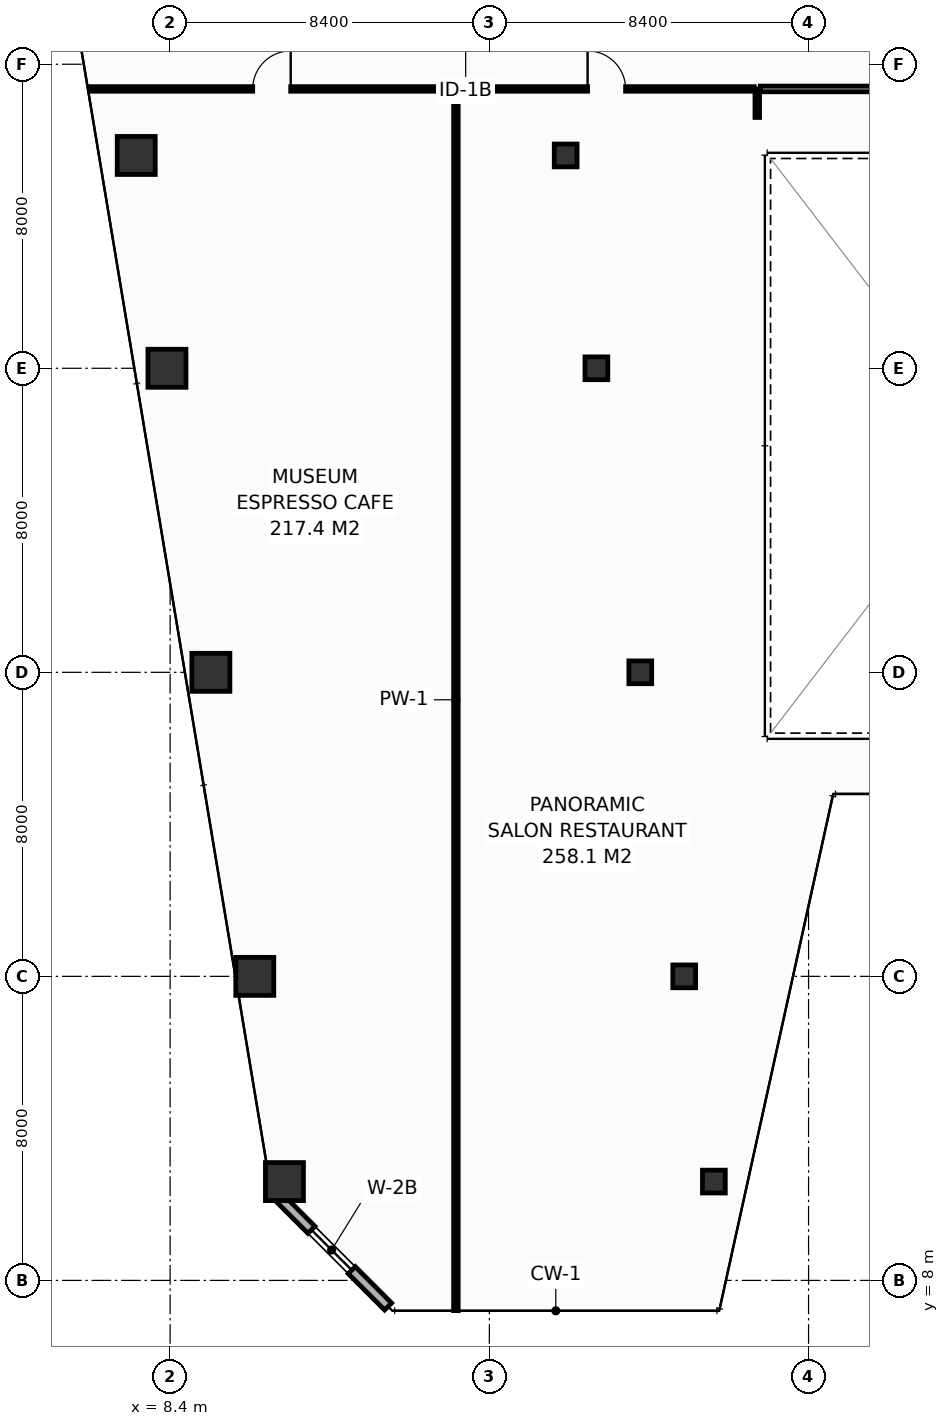
"""IFC4 building model, lengths in metres.
Left out: names, types, materials, properties, quantities, classifications, styles, units other than length and angle.
Written with IfcOpenShell. Run it as: python <this file> out.ifc"""

import sys

from ifc_helpers import new_model, si_unit, direction, frame, frame_2d, origin, origin_2d, place, context, subcontext, project, spatial, rectangle, hollow_rectangle, extrude, element, fill, save


model = new_model("IFC4")
c1 = context("Model", 3, precision=1e-05, world=origin(), true_north=direction((0.0, 1.0)))
c2 = subcontext(c1, "Body", "Model", "MODEL_VIEW")
j1 = project(units=[si_unit("LENGTHUNIT", "METRE"), si_unit("PLANEANGLEUNIT", "RADIAN")], contexts=[c1])
p1 = place(None, origin())
s1 = spatial("IfcSite", under=j1, at=p1, CompositionType="ELEMENT")
p2 = place(p1, origin())
s2 = spatial("IfcBuilding", under=s1, at=p2, CompositionType="ELEMENT")
p3 = place(p2, frame((0.0, 0.0, 106.0)))
s3 = spatial("IfcBuildingStorey", under=s2, at=p3, CompositionType="ELEMENT", Elevation=106.0)
p4 = place(p3, frame((11.408, 10.6, 0.0), z_axis=(0.0, 0.0, 1.0), x_axis=(1.0, 0.0, 0.0)))
e1 = element("IfcColumn", 1, at=p4, inside=s3, PredefinedType="COLUMN", context=c2, shape_type="SweptSolid", body=[
    extrude(hollow_rectangle(XDim=1.0, YDim=1.0, WallThickness=0.045, at=origin_2d()), origin(), (0.0, 0.0, 1.0), 4.4),
])
p5 = place(p3, frame((22.708, 10.6, 0.0), z_axis=(0.0, 0.0, 1.0), x_axis=(1.0, 0.0, 0.0)))
e2 = element("IfcColumn", 2, at=p5, inside=s3, PredefinedType="COLUMN", context=c2, shape_type="SweptSolid", body=[
    extrude(hollow_rectangle(XDim=0.6, YDim=0.6, WallThickness=0.028, at=origin_2d()), origin(), (0.0, 0.0, 1.0), 4.4),
])
p6 = place(p3, frame((10.628, 16.0, 0.0), z_axis=(0.0, 0.0, 1.0), x_axis=(1.0, 0.0, 0.0)))
e3 = element("IfcColumn", 3, at=p6, inside=s3, PredefinedType="COLUMN", context=c2, shape_type="SweptSolid", body=[
    extrude(hollow_rectangle(XDim=1.0, YDim=1.0, WallThickness=0.045, at=origin_2d()), origin(), (0.0, 0.0, 1.0), 4.4),
])
p7 = place(p3, frame((21.928, 16.0, 0.0), z_axis=(0.0, 0.0, 1.0), x_axis=(1.0, 0.0, 0.0)))
e4 = element("IfcColumn", 4, at=p7, inside=s3, PredefinedType="COLUMN", context=c2, shape_type="SweptSolid", body=[
    extrude(hollow_rectangle(XDim=0.6, YDim=0.6, WallThickness=0.028, at=origin_2d()), origin(), (0.0, 0.0, 1.0), 4.4),
])
p8 = place(p3, frame((9.472, 24.0, 0.0), z_axis=(0.0, 0.0, 1.0), x_axis=(1.0, 0.0, 0.0)))
e5 = element("IfcColumn", 5, at=p8, inside=s3, PredefinedType="COLUMN", context=c2, shape_type="SweptSolid", body=[
    extrude(hollow_rectangle(XDim=1.0, YDim=1.0, WallThickness=0.045, at=origin_2d()), origin(), (0.0, 0.0, 1.0), 4.4),
])
p9 = place(p3, frame((20.772, 24.0, 0.0), z_axis=(0.0, 0.0, 1.0), x_axis=(1.0, 0.0, 0.0)))
e6 = element("IfcColumn", 6, at=p9, inside=s3, PredefinedType="COLUMN", context=c2, shape_type="SweptSolid", body=[
    extrude(hollow_rectangle(XDim=0.6, YDim=0.6, WallThickness=0.028, at=origin_2d()), origin(), (0.0, 0.0, 1.0), 4.4),
])
p10 = place(p3, frame((8.317, 32.0, 0.0), z_axis=(0.0, 0.0, 1.0), x_axis=(1.0, 0.0, 0.0)))
e7 = element("IfcColumn", 7, at=p10, inside=s3, PredefinedType="COLUMN", context=c2, shape_type="SweptSolid", body=[
    extrude(hollow_rectangle(XDim=1.0, YDim=1.0, WallThickness=0.045, at=origin_2d()), origin(), (0.0, 0.0, 1.0), 4.4),
])
p11 = place(p3, frame((19.617, 32.0, 0.0), z_axis=(0.0, 0.0, 1.0), x_axis=(1.0, 0.0, 0.0)))
e8 = element("IfcColumn", 8, at=p11, inside=s3, PredefinedType="COLUMN", context=c2, shape_type="SweptSolid", body=[
    extrude(hollow_rectangle(XDim=0.6, YDim=0.6, WallThickness=0.028, at=origin_2d()), origin(), (0.0, 0.0, 1.0), 4.4),
])
p12 = place(p3, frame((7.508, 37.6, 0.0), z_axis=(0.0, 0.0, 1.0), x_axis=(1.0, 0.0, 0.0)))
e9 = element("IfcColumn", 9, at=p12, inside=s3, PredefinedType="COLUMN", context=c2, shape_type="SweptSolid", body=[
    extrude(hollow_rectangle(XDim=1.0, YDim=1.0, WallThickness=0.045, at=origin_2d()), origin(), (0.0, 0.0, 1.0), 4.4),
])
p13 = place(p3, frame((18.808, 37.6, 0.0), z_axis=(0.0, 0.0, 1.0), x_axis=(1.0, 0.0, 0.0)))
e10 = element("IfcColumn", 10, at=p13, inside=s3, PredefinedType="COLUMN", context=c2, shape_type="SweptSolid", body=[
    extrude(hollow_rectangle(XDim=0.6, YDim=0.6, WallThickness=0.028, at=origin_2d()), origin(), (0.0, 0.0, 1.0), 4.4),
])
p14 = place(p3, frame((11.162, 10.287, 0.0), z_axis=(0.0, 0.0, 1.0), x_axis=(0.70707775441, -0.707135806771, 0.0)))
e11 = element("IfcWall", 11, at=p14, inside=s3, PredefinedType="STANDARD", context=c2, shape_type="SweptSolid", body=[
    extrude(rectangle(XDim=4.206, YDim=0.26, at=frame_2d((2.103, 0.0))), origin(), (0.0, 0.0, 1.0), 4.15),
])
p15 = place(p14, frame((1.353, 0.0, 0.9)))
e12 = element("IfcOpeningElement", 12, at=p15, cuts=e11, PredefinedType="OPENING", context=c2, shape_type="SweptSolid", body=[
    extrude(rectangle(XDim=1.5, YDim=1.85, at=frame_2d((0.75, 0.925))), frame((0.0, 0.14, 0.0), z_axis=(0.0, -1.0, 0.0), x_axis=(1.0, 0.0, 0.0)), (0.0, 0.0, 1.0), 0.28),
])
p16 = place(p3, frame((15.92, 7.205, 0.0), z_axis=(0.0, 0.0, 1.0), x_axis=(0.0, 1.0, 0.0)))
e13 = element("IfcWall", 13, at=p16, inside=s3, PredefinedType="PARTITIONING", context=c2, shape_type="SweptSolid", body=[
    extrude(rectangle(XDim=32.145, YDim=0.12, at=frame_2d((16.073, 0.0))), origin(), (0.0, 0.0, 1.0), 3.335),
])
p17 = place(p3, frame((23.85, 38.6, 0.0), z_axis=(0.0, 0.0, 1.0), x_axis=(0.0, 1.0, 0.0)))
e14 = element("IfcWall", 14, at=p17, inside=s3, PredefinedType="PARTITIONING", context=c2, shape_type="SweptSolid", body=[
    extrude(rectangle(XDim=0.75, YDim=0.12, at=frame_2d((0.375, 0.0))), origin(), (0.0, 0.0, 1.0), 4.15),
])
p18 = place(p3, frame((6.305, 39.35, 0.0), z_axis=(0.0, 0.0, 1.0), x_axis=(1.0, 0.0, 0.0)))
e15 = element("IfcWall", 15, at=p18, inside=s3, PredefinedType="PARTITIONING", context=c2, shape_type="SweptSolid", body=[
    extrude(rectangle(XDim=9.535, YDim=0.12, at=frame_2d((4.768, 0.0))), origin(), (0.0, 0.0, 1.0), 3.635),
])
p19 = place(p18, frame((4.268, 0.0, 0.0)))
e16 = element("IfcOpeningElement", 16, at=p19, cuts=e15, PredefinedType="OPENING", context=c2, shape_type="SweptSolid", body=[
    extrude(rectangle(XDim=1.0, YDim=2.15, at=frame_2d((0.5, 1.075))), frame((0.0, 0.07, 0.0), z_axis=(0.0, -1.0, 0.0), x_axis=(1.0, 0.0, 0.0)), (0.0, 0.0, 1.0), 0.14),
])
p20 = place(p3, frame((16.0, 39.35, 0.0), z_axis=(0.0, 0.0, 1.0), x_axis=(1.0, 0.0, 0.0)))
e17 = element("IfcWall", 17, at=p20, inside=s3, PredefinedType="PARTITIONING", context=c2, shape_type="SweptSolid", body=[
    extrude(rectangle(XDim=7.77, YDim=0.12, at=frame_2d((3.885, 0.0))), origin(), (0.0, 0.0, 1.0), 3.335),
])
p21 = place(p20, frame((3.385, 0.0, 0.0)))
e18 = element("IfcOpeningElement", 18, at=p21, cuts=e17, PredefinedType="OPENING", context=c2, shape_type="SweptSolid", body=[
    extrude(rectangle(XDim=1.0, YDim=2.15, at=frame_2d((0.5, 1.075))), frame((0.0, 0.07, 0.0), z_axis=(0.0, -1.0, 0.0), x_axis=(1.0, 0.0, 0.0)), (0.0, 0.0, 1.0), 0.14),
])
p22 = place(p3, frame((23.93, 39.35, 0.0), z_axis=(0.0, 0.0, 1.0), x_axis=(1.0, 0.0, 0.0)))
e19 = element("IfcWall", 19, at=p22, inside=s3, PredefinedType="PARTITIONING", context=c2, shape_type="SweptSolid", body=[
    extrude(rectangle(XDim=12.14, YDim=0.15, at=frame_2d((6.07, 0.0))), origin(), (0.0, 0.0, 1.0), 4.15),
])
p23 = place(p15, origin())
e20 = element("IfcWindow", 20, at=p23, inside=s3, PartitioningType="SINGLE_PANEL", PredefinedType="WINDOW", context=c2, shape_type="SweptSolid", body=[
    extrude(rectangle(XDim=1.5, YDim=1.85, at=frame_2d((0.75, 0.925))), frame((0.0, 0.03, 0.0), z_axis=(0.0, -1.0, 0.0), x_axis=(1.0, 0.0, 0.0)), (0.0, 0.0, 1.0), 0.06),
])
fill(e12, e20)
p24 = place(p19, origin())
e21 = element("IfcDoor", 21, at=p24, inside=s3, OperationType="SINGLE_SWING_RIGHT", PredefinedType="DOOR", context=c2, shape_type="SweptSolid", body=[
    extrude(rectangle(XDim=1.0, YDim=2.15, at=frame_2d((0.5, 1.075))), frame((0.0, 0.025, 0.0), z_axis=(0.0, -1.0, 0.0), x_axis=(1.0, 0.0, 0.0)), (0.0, 0.0, 1.0), 0.05),
])
fill(e16, e21)
p25 = place(p21, origin())
e22 = element("IfcDoor", 22, at=p25, inside=s3, OperationType="SINGLE_SWING_LEFT", PredefinedType="DOOR", context=c2, shape_type="SweptSolid", body=[
    extrude(rectangle(XDim=1.0, YDim=2.15, at=frame_2d((0.5, 1.075))), frame((0.0, 0.025, 0.0), z_axis=(0.0, -1.0, 0.0), x_axis=(1.0, 0.0, 0.0)), (0.0, 0.0, 1.0), 0.05),
])
fill(e18, e22)
save(model, sys.argv[1])
